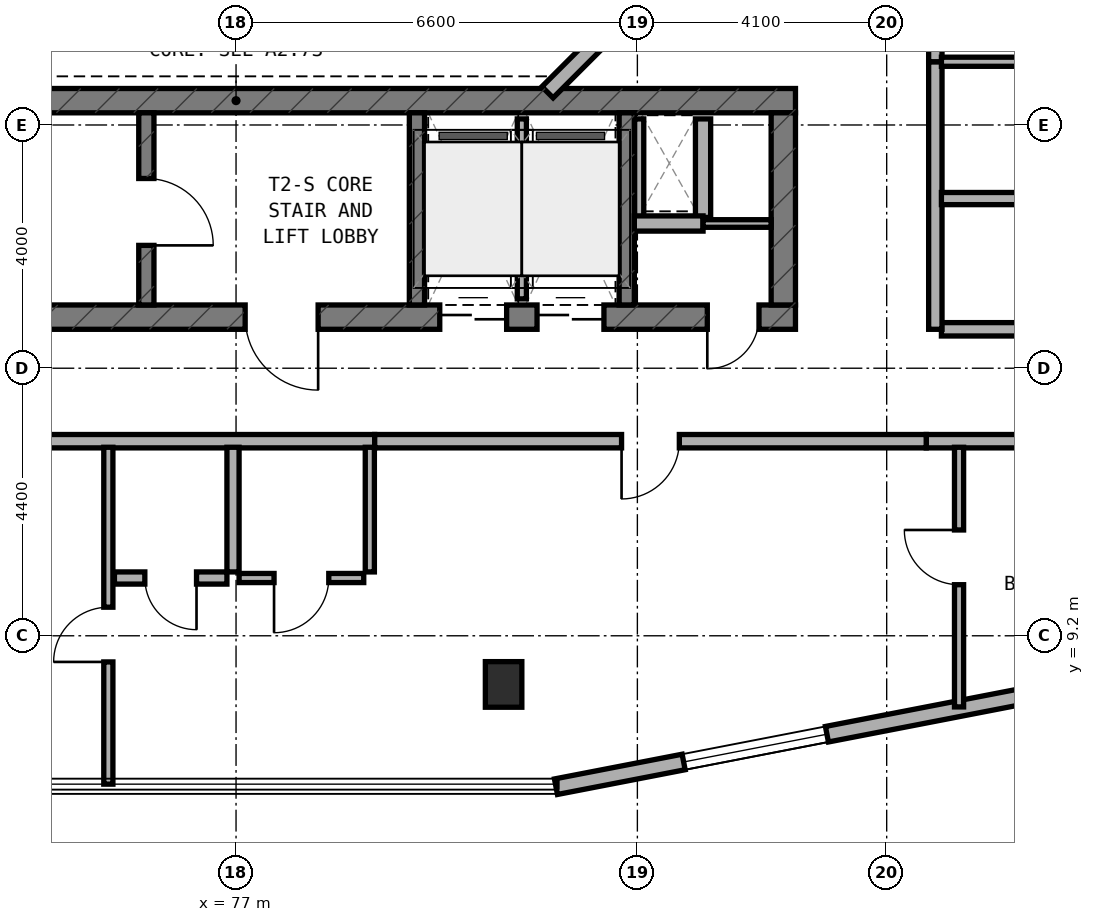
"""IFC4 building model, lengths in metres.
Left out: names, types, materials, properties, quantities, classifications, styles, units other than length and angle.
Written with IfcOpenShell. Run it as: python <this file> out.ifc"""

import sys

from ifc_helpers import new_model, si_unit, direction, frame, frame_2d, origin, origin_2d, place, context, subcontext, project, spatial, rectangle, extrude, element, fill, save


model = new_model("IFC4")
c1 = context("Model", 3, precision=1e-05, world=origin(), true_north=direction((0.0, 1.0)))
c2 = subcontext(c1, "Body", "Model", "MODEL_VIEW")
j1 = project(units=[si_unit("LENGTHUNIT", "METRE"), si_unit("PLANEANGLEUNIT", "RADIAN")], contexts=[c1])
p1 = place(None, origin())
s1 = spatial("IfcSite", under=j1, at=p1, CompositionType="ELEMENT")
p2 = place(p1, origin())
s2 = spatial("IfcBuilding", under=s1, at=p2, CompositionType="ELEMENT")
p3 = place(p2, frame((0.0, 0.0, 95.0)))
s3 = spatial("IfcBuildingStorey", under=s2, at=p3, CompositionType="ELEMENT", Elevation=95.0)
p4 = place(p3, frame((68.0, 14.44, 0.0), z_axis=(0.0, 0.0, 1.0), x_axis=(1.0, 0.0, 0.0)))
e1 = element("IfcWall", 1, at=p4, inside=s3, PredefinedType="SHEAR", context=c2, shape_type="SweptSolid", body=[
    extrude(rectangle(XDim=18.2, YDim=0.4, at=frame_2d((9.1, 0.0))), origin(), (0.0, 0.0, 1.0), 3.5),
])
p5 = place(p4, frame((9.15, 0.0, 0.0)))
e2 = element("IfcOpeningElement", 2, at=p5, cuts=e1, PredefinedType="OPENING", context=c2, shape_type="SweptSolid", body=[
    extrude(rectangle(XDim=1.2, YDim=2.15, at=frame_2d((0.6, 1.075))), frame((0.0, 0.21, 0.0), z_axis=(0.0, -1.0, 0.0), x_axis=(1.0, 0.0, 0.0)), (0.0, 0.0, 1.0), 0.42),
])
p6 = place(p4, frame((16.75, 0.0, 0.0)))
e3 = element("IfcOpeningElement", 3, at=p6, cuts=e1, PredefinedType="OPENING", context=c2, shape_type="SweptSolid", body=[
    extrude(rectangle(XDim=0.85, YDim=2.1, at=frame_2d((0.425, 1.05))), frame((0.0, 0.21, 0.0), z_axis=(0.0, -1.0, 0.0), x_axis=(1.0, 0.0, 0.0)), (0.0, 0.0, 1.0), 0.42),
])
p7 = place(p4, frame((12.35, 0.0, 0.0)))
e4 = element("IfcOpeningElement", 4, at=p7, cuts=e1, PredefinedType="OPENING", context=c2, shape_type="SweptSolid", body=[
    extrude(rectangle(XDim=1.1, YDim=2.15, at=frame_2d((0.55, 1.075))), frame((0.0, 0.21, 0.0), z_axis=(0.0, -1.0, 0.0), x_axis=(1.0, 0.0, 0.0)), (0.0, 0.0, 1.0), 0.42),
])
p8 = place(p4, frame((13.95, 0.0, 0.0)))
e5 = element("IfcOpeningElement", 5, at=p8, cuts=e1, PredefinedType="OPENING", context=c2, shape_type="SweptSolid", body=[
    extrude(rectangle(XDim=1.1, YDim=2.15, at=frame_2d((0.55, 1.075))), frame((0.0, 0.21, 0.0), z_axis=(0.0, -1.0, 0.0), x_axis=(1.0, 0.0, 0.0)), (0.0, 0.0, 1.0), 0.42),
])
p9 = place(p3, frame((68.0, 18.0, 0.0), z_axis=(0.0, 0.0, 1.0), x_axis=(1.0, 0.0, 0.0)))
e6 = element("IfcWall", 6, at=p9, inside=s3, PredefinedType="SHEAR", context=c2, shape_type="SweptSolid", body=[
    extrude(rectangle(XDim=18.2, YDim=0.4, at=frame_2d((9.1, 0.0))), origin(), (0.0, 0.0, 1.0), 3.5),
])
p10 = place(p3, frame((86.0, 14.64, 0.0), z_axis=(0.0, 0.0, 1.0), x_axis=(0.0, 1.0, 0.0)))
e7 = element("IfcWall", 7, at=p10, inside=s3, PredefinedType="SHEAR", context=c2, shape_type="SweptSolid", body=[
    extrude(rectangle(XDim=3.16, YDim=0.4, at=frame_2d((1.58, 0.0))), origin(), (0.0, 0.0, 1.0), 3.5),
])
p11 = place(p3, frame((75.525, 14.64, 0.0), z_axis=(0.0, 0.0, 1.0), x_axis=(0.0, 1.0, 0.0)))
e8 = element("IfcWall", 8, at=p11, inside=s3, PredefinedType="STANDARD", context=c2, shape_type="SweptSolid", body=[
    extrude(rectangle(XDim=3.16, YDim=0.25, at=frame_2d((1.58, 0.0))), origin(), (0.0, 0.0, 1.0), 3.25),
])
p12 = place(p11, frame((0.98, 0.0, 0.0)))
e9 = element("IfcOpeningElement", 9, at=p12, cuts=e8, PredefinedType="OPENING", context=c2, shape_type="SweptSolid", body=[
    extrude(rectangle(XDim=1.1, YDim=2.15, at=frame_2d((0.55, 1.075))), frame((0.0, 0.135, 0.0), z_axis=(0.0, -1.0, 0.0), x_axis=(1.0, 0.0, 0.0)), (0.0, 0.0, 1.0), 0.27),
])
for number, where, z_axis, x_axis in (
    (10, (79.975, 14.64, 0.0), (0.0, 0.0, 1.0), (0.0, 1.0, 0.0)),
    (11, (83.425, 14.64, 0.0), (0.0, 0.0, 1.0), (0.0, 1.0, 0.0)),
):
    element("IfcWall", number, at=place(p3, frame(where, z_axis=z_axis, x_axis=x_axis)), inside=s3, PredefinedType="STANDARD", context=c2, shape_type="SweptSolid", body=[
        extrude(rectangle(XDim=3.16, YDim=0.25, at=frame_2d((1.58, 0.0))), origin(), (0.0, 0.0, 1.0), 3.25),
    ])
p13 = place(p3, frame((81.4, 8.4, 0.0), z_axis=(0.0, 0.0, 1.0), x_axis=(1.0, 0.0, 0.0)))
e12 = element("IfcColumn", 12, at=p13, inside=s3, PredefinedType="COLUMN", context=c2, shape_type="SweptSolid", body=[
    extrude(rectangle(XDim=0.6, YDim=0.75, at=origin_2d()), origin(), (0.0, 0.0, 1.0), 3.5),
])
p14 = place(p3, frame((82.261, 6.718, 0.0), z_axis=(0.0, 0.0, 1.0), x_axis=(0.981750199588, 0.190175039396, 0.0)))
e13 = element("IfcWall", 13, at=p14, inside=s3, PredefinedType="STANDARD", context=c2, shape_type="SweptSolid", body=[
    extrude(rectangle(XDim=8.477, YDim=0.26, at=frame_2d((4.238, 0.0))), origin(), (0.0, 0.0, 1.0), 3.25),
])
p15 = place(p14, frame((2.139, 0.0, 0.8)))
e14 = element("IfcOpeningElement", 14, at=p15, cuts=e13, PredefinedType="OPENING", context=c2, shape_type="SweptSolid", body=[
    extrude(rectangle(XDim=2.4, YDim=1.6, at=frame_2d((1.2, 0.8))), frame((0.0, 0.14, 0.0), z_axis=(0.0, -1.0, 0.0), x_axis=(1.0, 0.0, 0.0)), (0.0, 0.0, 1.0), 0.28),
])
p16 = place(p3, frame((82.122, 18.138, 0.0), z_axis=(0.0, 0.0, 1.0), x_axis=(0.707106781187, 0.707106781187, 0.0)))
e15 = element("IfcWall", 15, at=p16, inside=s3, PredefinedType="STANDARD", context=c2, shape_type="SweptSolid", body=[
    extrude(rectangle(XDim=2.311, YDim=0.26, at=frame_2d((1.155, 0.0))), origin(), (0.0, 0.0, 1.0), 3.25),
])
p17 = place(p3, frame((83.63, 16.08, 0.0), z_axis=(0.0, 0.0, 1.0), x_axis=(0.0, 1.0, 0.0)))
e16 = element("IfcWall", 16, at=p17, inside=s3, PredefinedType="PARTITIONING", context=c2, shape_type="SweptSolid", body=[
    extrude(rectangle(XDim=1.62, YDim=0.15, at=frame_2d((0.81, 0.0))), origin(), (0.0, 0.0, 1.0), 2.825),
])
p18 = place(p3, frame((84.68, 16.08, 0.0), z_axis=(0.0, 0.0, 1.0), x_axis=(0.0, 1.0, 0.0)))
e17 = element("IfcWall", 17, at=p18, inside=s3, PredefinedType="SOLIDWALL", context=c2, shape_type="SweptSolid", body=[
    extrude(rectangle(XDim=1.62, YDim=0.25, at=frame_2d((0.81, 0.0))), origin(), (0.0, 0.0, 1.0), 3.22),
])
p19 = place(p3, frame((83.55, 15.98, 0.0), z_axis=(0.0, 0.0, 1.0), x_axis=(1.0, 0.0, 0.0)))
e18 = element("IfcWall", 18, at=p19, inside=s3, PredefinedType="SOLIDWALL", context=c2, shape_type="SweptSolid", body=[
    extrude(rectangle(XDim=1.13, YDim=0.25, at=frame_2d((0.565, 0.0))), origin(), (0.0, 0.0, 1.0), 3.22),
])
p20 = place(p3, frame((84.68, 15.98, 0.0), z_axis=(0.0, 0.0, 1.0), x_axis=(1.0, 0.0, 0.0)))
e19 = element("IfcWall", 19, at=p20, inside=s3, PredefinedType="PARTITIONING", context=c2, shape_type="SweptSolid", body=[
    extrude(rectangle(XDim=1.12, YDim=0.125, at=frame_2d((0.56, 0.0))), origin(), (0.0, 0.0, 1.0), 3.22),
])
p21 = place(p3, frame((81.7, 14.74, 0.0), z_axis=(0.0, 0.0, 1.0), x_axis=(0.0, 1.0, 0.0)))
e20 = element("IfcWall", 20, at=p21, inside=s3, PredefinedType="PARTITIONING", context=c2, shape_type="SweptSolid", body=[
    extrude(rectangle(XDim=2.96, YDim=0.15, at=frame_2d((1.48, 0.0))), origin(), (0.0, 0.0, 1.0), 3.22),
])
p22 = place(p3, frame((72.6, 12.4, 0.0), z_axis=(0.0, 0.0, 1.0), x_axis=(1.0, 0.0, 0.0)))
e21 = element("IfcWall", 21, at=p22, inside=s3, PredefinedType="SOLIDWALL", context=c2, shape_type="SweptSolid", body=[
    extrude(rectangle(XDim=6.68, YDim=0.22, at=frame_2d((3.34, 0.0))), origin(), (0.0, 0.0, 1.0), 2.825),
])
p23 = place(p3, frame((88.35, 12.4, 0.0), z_axis=(0.0, 0.0, 1.0), x_axis=(1.0, 0.0, 0.0)))
e22 = element("IfcWall", 22, at=p23, inside=s3, PredefinedType="SOLIDWALL", context=c2, shape_type="SweptSolid", body=[
    extrude(rectangle(XDim=6.29, YDim=0.22, at=frame_2d((3.145, 0.0))), origin(), (0.0, 0.0, 1.0), 2.945),
])
p24 = place(p3, frame((79.28, 12.4, 0.0), z_axis=(0.0, 0.0, 1.0), x_axis=(1.0, 0.0, 0.0)))
e23 = element("IfcWall", 23, at=p24, inside=s3, PredefinedType="SOLIDWALL", context=c2, shape_type="SweptSolid", body=[
    extrude(rectangle(XDim=9.07, YDim=0.22, at=frame_2d((4.535, 0.0))), origin(), (0.0, 0.0, 1.0), 2.825),
])
p25 = place(p24, frame((4.06, 0.0, 0.0)))
e24 = element("IfcOpeningElement", 24, at=p25, cuts=e23, PredefinedType="OPENING", context=c2, shape_type="SweptSolid", body=[
    extrude(rectangle(XDim=0.95, YDim=2.1, at=frame_2d((0.475, 1.05))), frame((0.0, 0.12, 0.0), z_axis=(0.0, -1.0, 0.0), x_axis=(1.0, 0.0, 0.0)), (0.0, 0.0, 1.0), 0.24),
])
p26 = place(p3, frame((74.9, 6.76, 0.0), z_axis=(0.0, 0.0, 1.0), x_axis=(0.0, 1.0, 0.0)))
e25 = element("IfcWall", 25, at=p26, inside=s3, PredefinedType="PARTITIONING", context=c2, shape_type="SweptSolid", body=[
    extrude(rectangle(XDim=5.54, YDim=0.15, at=frame_2d((2.77, 0.0))), origin(), (0.0, 0.0, 1.0), 2.945),
])
p27 = place(p26, frame((2.01, 0.0, 0.0)))
e26 = element("IfcOpeningElement", 26, at=p27, cuts=e25, PredefinedType="OPENING", context=c2, shape_type="SweptSolid", body=[
    extrude(rectangle(XDim=0.9, YDim=2.1, at=frame_2d((0.45, 1.05))), frame((0.0, 0.085, 0.0), z_axis=(0.0, -1.0, 0.0), x_axis=(1.0, 0.0, 0.0)), (0.0, 0.0, 1.0), 0.17),
])
p28 = place(p3, frame((88.89, 8.03, 0.0), z_axis=(0.0, 0.0, 1.0), x_axis=(0.0, 1.0, 0.0)))
e27 = element("IfcWall", 27, at=p28, inside=s3, PredefinedType="PARTITIONING", context=c2, shape_type="SweptSolid", body=[
    extrude(rectangle(XDim=4.27, YDim=0.15, at=frame_2d((2.135, 0.0))), origin(), (0.0, 0.0, 1.0), 2.945),
])
p29 = place(p28, frame((2.01, 0.0, 0.0)))
e28 = element("IfcOpeningElement", 28, at=p29, cuts=e27, PredefinedType="OPENING", context=c2, shape_type="SweptSolid", body=[
    extrude(rectangle(XDim=0.9, YDim=2.1, at=frame_2d((0.45, 1.05))), frame((0.0, 0.085, 0.0), z_axis=(0.0, -1.0, 0.0), x_axis=(1.0, 0.0, 0.0)), (0.0, 0.0, 1.0), 0.17),
])
p30 = place(p3, frame((76.95, 10.25, 0.0), z_axis=(0.0, 0.0, 1.0), x_axis=(0.0, 1.0, 0.0)))
e29 = element("IfcWall", 29, at=p30, inside=s3, PredefinedType="PLUMBINGWALL", context=c2, shape_type="SweptSolid", body=[
    extrude(rectangle(XDim=2.05, YDim=0.2, at=frame_2d((1.025, 0.0))), origin(), (0.0, 0.0, 1.0), 2.955),
])
p31 = place(p3, frame((79.2, 10.25, 0.0), z_axis=(0.0, 0.0, 1.0), x_axis=(0.0, 1.0, 0.0)))
e30 = element("IfcWall", 30, at=p31, inside=s3, PredefinedType="PARTITIONING", context=c2, shape_type="SweptSolid", body=[
    extrude(rectangle(XDim=2.05, YDim=0.15, at=frame_2d((1.025, 0.0))), origin(), (0.0, 0.0, 1.0), 2.955),
])
p32 = place(p3, frame((75.0, 10.15, 0.0), z_axis=(0.0, 0.0, 1.0), x_axis=(1.0, 0.0, 0.0)))
e31 = element("IfcWall", 31, at=p32, inside=s3, PredefinedType="PLUMBINGWALL", context=c2, shape_type="SweptSolid", body=[
    extrude(rectangle(XDim=1.85, YDim=0.2, at=frame_2d((0.925, 0.0))), origin(), (0.0, 0.0, 1.0), 3.22),
])
p33 = place(p32, frame((0.5, 0.0, 0.0)))
e32 = element("IfcOpeningElement", 32, at=p33, cuts=e31, PredefinedType="OPENING", context=c2, shape_type="SweptSolid", body=[
    extrude(rectangle(XDim=0.85, YDim=2.1, at=frame_2d((0.425, 1.05))), frame((0.0, 0.11, 0.0), z_axis=(0.0, -1.0, 0.0), x_axis=(1.0, 0.0, 0.0)), (0.0, 0.0, 1.0), 0.22),
])
p34 = place(p3, frame((77.05, 10.15, 0.0), z_axis=(0.0, 0.0, 1.0), x_axis=(1.0, 0.0, 0.0)))
e33 = element("IfcWall", 33, at=p34, inside=s3, PredefinedType="PARTITIONING", context=c2, shape_type="SweptSolid", body=[
    extrude(rectangle(XDim=2.05, YDim=0.15, at=frame_2d((1.025, 0.0))), origin(), (0.0, 0.0, 1.0), 3.22),
])
p35 = place(p34, frame((0.575, 0.0, 0.0)))
e34 = element("IfcOpeningElement", 34, at=p35, cuts=e33, PredefinedType="OPENING", context=c2, shape_type="SweptSolid", body=[
    extrude(rectangle(XDim=0.9, YDim=2.1, at=frame_2d((0.45, 1.05))), frame((0.0, 0.085, 0.0), z_axis=(0.0, -1.0, 0.0), x_axis=(1.0, 0.0, 0.0)), (0.0, 0.0, 1.0), 0.17),
])
p36 = place(p3, frame((88.6, 14.24, 0.0), z_axis=(0.0, 0.0, 1.0), x_axis=(1.0, 0.0, 0.0)))
e35 = element("IfcWall", 35, at=p36, inside=s3, PredefinedType="SOLIDWALL", context=c2, shape_type="SweptSolid", body=[
    extrude(rectangle(XDim=5.88, YDim=0.22, at=frame_2d((2.94, 0.0))), origin(), (0.0, 0.0, 1.0), 2.945),
])
p37 = place(p3, frame((88.5, 14.24, 0.0), z_axis=(0.0, 0.0, 1.0), x_axis=(0.0, 1.0, 0.0)))
e36 = element("IfcWall", 36, at=p37, inside=s3, PredefinedType="SOLIDWALL", context=c2, shape_type="SweptSolid", body=[
    extrude(rectangle(XDim=4.4, YDim=0.22, at=frame_2d((2.2, 0.0))), origin(), (0.0, 0.0, 1.0), 3.22),
])
p38 = place(p3, frame((88.5, 18.64, 0.0), z_axis=(0.0, 0.0, 1.0), x_axis=(0.0, 1.0, 0.0)))
e37 = element("IfcWall", 37, at=p38, inside=s3, PredefinedType="SOLIDWALL", context=c2, shape_type="SweptSolid", body=[
    extrude(rectangle(XDim=4.86, YDim=0.22, at=frame_2d((2.43, 0.0))), origin(), (0.0, 0.0, 1.0), 2.825),
])
p39 = place(p38, frame((1.955, 0.0, 0.0)))
e38 = element("IfcOpeningElement", 38, at=p39, cuts=e37, PredefinedType="OPENING", context=c2, shape_type="SweptSolid", body=[
    extrude(rectangle(XDim=0.95, YDim=2.1, at=frame_2d((0.475, 1.05))), frame((0.0, 0.12, 0.0), z_axis=(0.0, -1.0, 0.0), x_axis=(1.0, 0.0, 0.0)), (0.0, 0.0, 1.0), 0.24),
])
p40 = place(p3, frame((88.6, 16.39, 0.0), z_axis=(0.0, 0.0, 1.0), x_axis=(1.0, 0.0, 0.0)))
e39 = element("IfcWall", 39, at=p40, inside=s3, PredefinedType="PLUMBINGWALL", context=c2, shape_type="SweptSolid", body=[
    extrude(rectangle(XDim=2.0, YDim=0.2, at=frame_2d((1.0, 0.0))), origin(), (0.0, 0.0, 1.0), 3.22),
])
p41 = place(p3, frame((88.6, 18.64, 0.0), z_axis=(0.0, 0.0, 1.0), x_axis=(1.0, 0.0, 0.0)))
e40 = element("IfcWall", 40, at=p41, inside=s3, PredefinedType="PARTITIONING", context=c2, shape_type="SweptSolid", body=[
    extrude(rectangle(XDim=2.0, YDim=0.15, at=frame_2d((1.0, 0.0))), origin(), (0.0, 0.0, 1.0), 3.22),
])
p42 = place(p15, origin())
e41 = element("IfcWindow", 41, at=p42, inside=s3, PartitioningType="SINGLE_PANEL", PredefinedType="WINDOW", context=c2, shape_type="SweptSolid", body=[
    extrude(rectangle(XDim=2.4, YDim=1.6, at=frame_2d((1.2, 0.8))), frame((0.0, 0.03, 0.0), z_axis=(0.0, -1.0, 0.0), x_axis=(1.0, 0.0, 0.0)), (0.0, 0.0, 1.0), 0.06),
])
fill(e14, e41)
p43 = place(p12, frame((1.1, 0.0, 0.0), z_axis=(0.0, 0.0, 1.0), x_axis=(-1.0, 0.0, 0.0)))
e42 = element("IfcDoor", 42, at=p43, inside=s3, OperationType="SINGLE_SWING_RIGHT", PredefinedType="DOOR", context=c2, shape_type="SweptSolid", body=[
    extrude(rectangle(XDim=1.1, YDim=2.15, at=frame_2d((0.55, 1.075))), frame((0.0, 0.025, 0.0), z_axis=(0.0, -1.0, 0.0), x_axis=(1.0, 0.0, 0.0)), (0.0, 0.0, 1.0), 0.05),
])
fill(e9, e42)
p44 = place(p5, frame((1.2, 0.0, 0.0), z_axis=(0.0, 0.0, 1.0), x_axis=(-1.0, 0.0, 0.0)))
e43 = element("IfcDoor", 43, at=p44, inside=s3, OperationType="SINGLE_SWING_LEFT", PredefinedType="DOOR", context=c2, shape_type="SweptSolid", body=[
    extrude(rectangle(XDim=1.2, YDim=2.15, at=frame_2d((0.6, 1.075))), frame((0.0, 0.025, 0.0), z_axis=(0.0, -1.0, 0.0), x_axis=(1.0, 0.0, 0.0)), (0.0, 0.0, 1.0), 0.05),
])
fill(e2, e43)
p45 = place(p6, frame((0.85, 0.0, 0.0), z_axis=(0.0, 0.0, 1.0), x_axis=(-1.0, 0.0, 0.0)))
e44 = element("IfcDoor", 44, at=p45, inside=s3, OperationType="SINGLE_SWING_RIGHT", PredefinedType="DOOR", context=c2, shape_type="SweptSolid", body=[
    extrude(rectangle(XDim=0.85, YDim=2.1, at=frame_2d((0.425, 1.05))), frame((0.0, 0.025, 0.0), z_axis=(0.0, -1.0, 0.0), x_axis=(1.0, 0.0, 0.0)), (0.0, 0.0, 1.0), 0.05),
])
fill(e3, e44)
p46 = place(p7, frame((1.1, 0.0, 0.0), z_axis=(0.0, 0.0, 1.0), x_axis=(-1.0, 0.0, 0.0)))
e45 = element("IfcDoor", 45, at=p46, inside=s3, OperationType="DOUBLE_DOOR_SLIDING", PredefinedType="DOOR", context=c2, shape_type="SweptSolid", body=[
    extrude(rectangle(XDim=1.1, YDim=2.15, at=frame_2d((0.55, 1.075))), frame((0.0, 0.025, 0.0), z_axis=(0.0, -1.0, 0.0), x_axis=(1.0, 0.0, 0.0)), (0.0, 0.0, 1.0), 0.05),
])
fill(e4, e45)
p47 = place(p8, frame((1.1, 0.0, 0.0), z_axis=(0.0, 0.0, 1.0), x_axis=(-1.0, 0.0, 0.0)))
e46 = element("IfcDoor", 46, at=p47, inside=s3, OperationType="DOUBLE_DOOR_SLIDING", PredefinedType="DOOR", context=c2, shape_type="SweptSolid", body=[
    extrude(rectangle(XDim=1.1, YDim=2.15, at=frame_2d((0.55, 1.075))), frame((0.0, 0.025, 0.0), z_axis=(0.0, -1.0, 0.0), x_axis=(1.0, 0.0, 0.0)), (0.0, 0.0, 1.0), 0.05),
])
fill(e5, e46)
p48 = place(p25, frame((0.95, 0.0, 0.0), z_axis=(0.0, 0.0, 1.0), x_axis=(-1.0, 0.0, 0.0)))
e47 = element("IfcDoor", 47, at=p48, inside=s3, OperationType="SINGLE_SWING_RIGHT", PredefinedType="DOOR", context=c2, shape_type="SweptSolid", body=[
    extrude(rectangle(XDim=0.95, YDim=2.1, at=frame_2d((0.475, 1.05))), frame((0.0, 0.025, 0.0), z_axis=(0.0, -1.0, 0.0), x_axis=(1.0, 0.0, 0.0)), (0.0, 0.0, 1.0), 0.05),
])
fill(e24, e47)
p49 = place(p27, origin())
e48 = element("IfcDoor", 48, at=p49, inside=s3, OperationType="SINGLE_SWING_LEFT", PredefinedType="DOOR", context=c2, shape_type="SweptSolid", body=[
    extrude(rectangle(XDim=0.9, YDim=2.1, at=frame_2d((0.45, 1.05))), frame((0.0, 0.025, 0.0), z_axis=(0.0, -1.0, 0.0), x_axis=(1.0, 0.0, 0.0)), (0.0, 0.0, 1.0), 0.05),
])
fill(e26, e48)
p50 = place(p29, origin())
e49 = element("IfcDoor", 49, at=p50, inside=s3, OperationType="SINGLE_SWING_RIGHT", PredefinedType="DOOR", context=c2, shape_type="SweptSolid", body=[
    extrude(rectangle(XDim=0.9, YDim=2.1, at=frame_2d((0.45, 1.05))), frame((0.0, 0.025, 0.0), z_axis=(0.0, -1.0, 0.0), x_axis=(1.0, 0.0, 0.0)), (0.0, 0.0, 1.0), 0.05),
])
fill(e28, e49)
p51 = place(p33, frame((0.85, 0.0, 0.0), z_axis=(0.0, 0.0, 1.0), x_axis=(-1.0, 0.0, 0.0)))
e50 = element("IfcDoor", 50, at=p51, inside=s3, OperationType="SINGLE_SWING_LEFT", PredefinedType="DOOR", context=c2, shape_type="SweptSolid", body=[
    extrude(rectangle(XDim=0.85, YDim=2.1, at=frame_2d((0.425, 1.05))), frame((0.0, 0.025, 0.0), z_axis=(0.0, -1.0, 0.0), x_axis=(1.0, 0.0, 0.0)), (0.0, 0.0, 1.0), 0.05),
])
fill(e32, e50)
p52 = place(p35, frame((0.9, 0.0, 0.0), z_axis=(0.0, 0.0, 1.0), x_axis=(-1.0, 0.0, 0.0)))
e51 = element("IfcDoor", 51, at=p52, inside=s3, OperationType="SINGLE_SWING_RIGHT", PredefinedType="DOOR", context=c2, shape_type="SweptSolid", body=[
    extrude(rectangle(XDim=0.9, YDim=2.1, at=frame_2d((0.45, 1.05))), frame((0.0, 0.025, 0.0), z_axis=(0.0, -1.0, 0.0), x_axis=(1.0, 0.0, 0.0)), (0.0, 0.0, 1.0), 0.05),
])
fill(e34, e51)
save(model, sys.argv[1])
